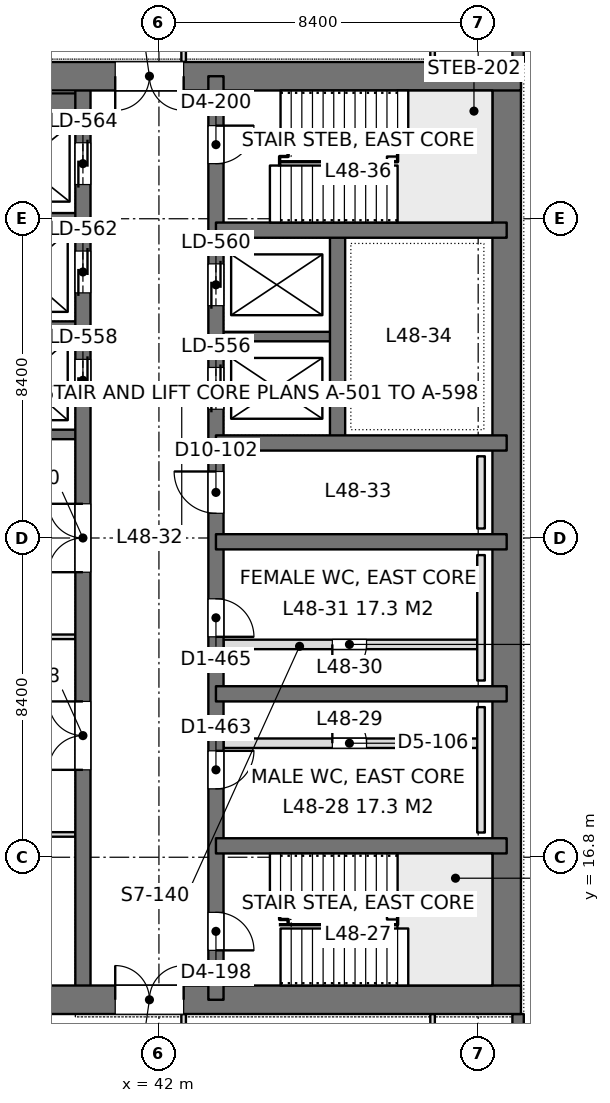
"""IFC4 building model, lengths in metres.
Left out: names, types, materials, properties, quantities, classifications, styles, units other than length and angle.
Written with IfcOpenShell. Run it as: python <this file> out.ifc"""

import sys

from ifc_helpers import new_model, si_unit, direction, frame, frame_2d, origin, place, context, subcontext, project, spatial, rectangle, extrude, element, fill, save


model = new_model("IFC4")
c1 = context("Model", 3, precision=1e-05, world=origin(), true_north=direction((0.0, 1.0)))
c2 = subcontext(c1, "Body", "Model", "MODEL_VIEW")
j1 = project(units=[si_unit("LENGTHUNIT", "METRE"), si_unit("PLANEANGLEUNIT", "RADIAN")], contexts=[c1])
p1 = place(None, origin())
s1 = spatial("IfcSite", under=j1, at=p1, CompositionType="ELEMENT")
p2 = place(p1, origin())
s2 = spatial("IfcBuilding", under=s1, at=p2, CompositionType="ELEMENT")
p3 = place(p2, frame((0.0, 0.0, 211.2)))
s3 = spatial("IfcBuildingStorey", under=s2, at=p3, CompositionType="ELEMENT", Elevation=211.2)
p4 = place(p3, frame((33.675, 13.05, 0.0), z_axis=(0.0, 0.0, 1.0), x_axis=(1.0, 0.0, 0.0)))
e1 = element("IfcWall", 1, at=p4, inside=s3, PredefinedType="SHEAR", context=c2, shape_type="SweptSolid", body=[
    extrude(rectangle(XDim=17.85, YDim=0.75, at=frame_2d((8.925, 0.0))), origin(), (0.0, 0.0, 1.0), 4.2),
])
p5 = place(p4, frame((7.175, 0.0, 0.0)))
e2 = element("IfcOpeningElement", 2, at=p5, cuts=e1, PredefinedType="OPENING", context=c2, shape_type="SweptSolid", body=[
    extrude(rectangle(XDim=1.8, YDim=2.4, at=frame_2d((0.9, 1.2))), frame((0.0, 0.385, 0.0), z_axis=(0.0, -1.0, 0.0), x_axis=(1.0, 0.0, 0.0)), (0.0, 0.0, 1.0), 0.77),
])
p6 = place(p3, frame((33.675, 37.35, 0.0), z_axis=(0.0, 0.0, 1.0), x_axis=(1.0, 0.0, 0.0)))
e3 = element("IfcWall", 3, at=p6, inside=s3, PredefinedType="SHEAR", context=c2, shape_type="SweptSolid", body=[
    extrude(rectangle(XDim=17.85, YDim=0.75, at=frame_2d((8.925, 0.0))), origin(), (0.0, 0.0, 1.0), 4.2),
])
p7 = place(p6, frame((7.175, 0.0, 0.0)))
e4 = element("IfcOpeningElement", 4, at=p7, cuts=e3, PredefinedType="OPENING", context=c2, shape_type="SweptSolid", body=[
    extrude(rectangle(XDim=1.8, YDim=2.4, at=frame_2d((0.9, 1.2))), frame((0.0, 0.385, 0.0), z_axis=(0.0, -1.0, 0.0), x_axis=(1.0, 0.0, 0.0)), (0.0, 0.0, 1.0), 0.77),
])
p8 = place(p3, frame((51.15, 13.05, 0.0), z_axis=(0.0, 0.0, 1.0), x_axis=(0.0, 1.0, 0.0)))
e5 = element("IfcWall", 5, at=p8, inside=s3, PredefinedType="SHEAR", context=c2, shape_type="SweptSolid", body=[
    extrude(rectangle(XDim=24.3, YDim=0.75, at=frame_2d((12.15, 0.0))), origin(), (0.0, 0.0, 1.0), 4.2),
])
p9 = place(p3, frame((43.5, 13.05, 0.0), z_axis=(0.0, 0.0, 1.0), x_axis=(0.0, 1.0, 0.0)))
e6 = element("IfcWall", 6, at=p9, inside=s3, PredefinedType="SHEAR", context=c2, shape_type="SweptSolid", body=[
    extrude(rectangle(XDim=24.3, YDim=0.4, at=frame_2d((12.15, 0.0))), origin(), (0.0, 0.0, 1.0), 4.2),
])
p10 = place(p9, frame((1.3, 0.0, 0.0)))
e7 = element("IfcOpeningElement", 7, at=p10, cuts=e6, PredefinedType="OPENING", context=c2, shape_type="SweptSolid", body=[
    extrude(rectangle(XDim=1.0, YDim=2.2, at=frame_2d((0.5, 1.1))), frame((0.0, 0.21, 0.0), z_axis=(0.0, -1.0, 0.0), x_axis=(1.0, 0.0, 0.0)), (0.0, 0.0, 1.0), 0.42),
])
p11 = place(p9, frame((22.0, 0.0, 0.0)))
e8 = element("IfcOpeningElement", 8, at=p11, cuts=e6, PredefinedType="OPENING", context=c2, shape_type="SweptSolid", body=[
    extrude(rectangle(XDim=1.0, YDim=2.2, at=frame_2d((0.5, 1.1))), frame((0.0, 0.21, 0.0), z_axis=(0.0, -1.0, 0.0), x_axis=(1.0, 0.0, 0.0)), (0.0, 0.0, 1.0), 0.42),
])
p12 = place(p9, frame((5.55, 0.0, 0.0)))
e9 = element("IfcOpeningElement", 9, at=p12, cuts=e6, PredefinedType="OPENING", context=c2, shape_type="SweptSolid", body=[
    extrude(rectangle(XDim=1.0, YDim=2.2, at=frame_2d((0.5, 1.1))), frame((0.0, 0.21, 0.0), z_axis=(0.0, -1.0, 0.0), x_axis=(1.0, 0.0, 0.0)), (0.0, 0.0, 1.0), 0.42),
])
p13 = place(p9, frame((9.55, 0.0, 0.0)))
e10 = element("IfcOpeningElement", 10, at=p13, cuts=e6, PredefinedType="OPENING", context=c2, shape_type="SweptSolid", body=[
    extrude(rectangle(XDim=1.0, YDim=2.2, at=frame_2d((0.5, 1.1))), frame((0.0, 0.21, 0.0), z_axis=(0.0, -1.0, 0.0), x_axis=(1.0, 0.0, 0.0)), (0.0, 0.0, 1.0), 0.42),
])
p14 = place(p9, frame((12.8, 0.0, 0.0)))
e11 = element("IfcOpeningElement", 11, at=p14, cuts=e6, PredefinedType="OPENING", context=c2, shape_type="SweptSolid", body=[
    extrude(rectangle(XDim=1.1, YDim=2.2, at=frame_2d((0.55, 1.1))), frame((0.0, 0.21, 0.0), z_axis=(0.0, -1.0, 0.0), x_axis=(1.0, 0.0, 0.0)), (0.0, 0.0, 1.0), 0.42),
])
p15 = place(p9, frame((15.538, 0.0, 0.0)))
e12 = element("IfcOpeningElement", 12, at=p15, cuts=e6, PredefinedType="OPENING", context=c2, shape_type="SweptSolid", body=[
    extrude(rectangle(XDim=1.1, YDim=2.2, at=frame_2d((0.55, 1.1))), frame((0.0, 0.21, 0.0), z_axis=(0.0, -1.0, 0.0), x_axis=(1.0, 0.0, 0.0)), (0.0, 0.0, 1.0), 0.42),
])
p16 = place(p9, frame((18.262, 0.0, 0.0)))
e13 = element("IfcOpeningElement", 13, at=p16, cuts=e6, PredefinedType="OPENING", context=c2, shape_type="SweptSolid", body=[
    extrude(rectangle(XDim=1.1, YDim=2.2, at=frame_2d((0.55, 1.1))), frame((0.0, 0.21, 0.0), z_axis=(0.0, -1.0, 0.0), x_axis=(1.0, 0.0, 0.0)), (0.0, 0.0, 1.0), 0.42),
])
p17 = place(p3, frame((40.0, 13.05, 0.0), z_axis=(0.0, 0.0, 1.0), x_axis=(0.0, 1.0, 0.0)))
e14 = element("IfcWall", 14, at=p17, inside=s3, PredefinedType="SHEAR", context=c2, shape_type="SweptSolid", body=[
    extrude(rectangle(XDim=24.3, YDim=0.4, at=frame_2d((12.15, 0.0))), origin(), (0.0, 0.0, 1.0), 4.2),
])
p18 = place(p17, frame((15.75, 0.0, 0.0)))
e15 = element("IfcOpeningElement", 15, at=p18, cuts=e14, PredefinedType="OPENING", context=c2, shape_type="SweptSolid", body=[
    extrude(rectangle(XDim=1.1, YDim=2.2, at=frame_2d((0.55, 1.1))), frame((0.0, 0.21, 0.0), z_axis=(0.0, -1.0, 0.0), x_axis=(1.0, 0.0, 0.0)), (0.0, 0.0, 1.0), 0.42),
])
p19 = place(p17, frame((18.6, 0.0, 0.0)))
e16 = element("IfcOpeningElement", 16, at=p19, cuts=e14, PredefinedType="OPENING", context=c2, shape_type="SweptSolid", body=[
    extrude(rectangle(XDim=1.1, YDim=2.2, at=frame_2d((0.55, 1.1))), frame((0.0, 0.21, 0.0), z_axis=(0.0, -1.0, 0.0), x_axis=(1.0, 0.0, 0.0)), (0.0, 0.0, 1.0), 0.42),
])
p20 = place(p17, frame((21.45, 0.0, 0.0)))
e17 = element("IfcOpeningElement", 17, at=p20, cuts=e14, PredefinedType="OPENING", context=c2, shape_type="SweptSolid", body=[
    extrude(rectangle(XDim=1.1, YDim=2.2, at=frame_2d((0.55, 1.1))), frame((0.0, 0.21, 0.0), z_axis=(0.0, -1.0, 0.0), x_axis=(1.0, 0.0, 0.0)), (0.0, 0.0, 1.0), 0.42),
])
p21 = place(p17, frame((6.05, 0.0, 0.0)))
e18 = element("IfcOpeningElement", 18, at=p21, cuts=e14, PredefinedType="OPENING", context=c2, shape_type="SweptSolid", body=[
    extrude(rectangle(XDim=1.8, YDim=2.4, at=frame_2d((0.9, 1.2))), frame((0.0, 0.21, 0.0), z_axis=(0.0, -1.0, 0.0), x_axis=(1.0, 0.0, 0.0)), (0.0, 0.0, 1.0), 0.42),
])
p22 = place(p17, frame((11.25, 0.0, 0.0)))
e19 = element("IfcOpeningElement", 19, at=p22, cuts=e14, PredefinedType="OPENING", context=c2, shape_type="SweptSolid", body=[
    extrude(rectangle(XDim=1.8, YDim=2.4, at=frame_2d((0.9, 1.2))), frame((0.0, 0.21, 0.0), z_axis=(0.0, -1.0, 0.0), x_axis=(1.0, 0.0, 0.0)), (0.0, 0.0, 1.0), 0.42),
])
for number, where, z_axis, x_axis in (
    (20, (51.15, 17.1, 0.0), (0.0, 0.0, 1.0), (-1.0, 0.0, 0.0)),
    (21, (51.15, 21.1, 0.0), (0.0, 0.0, 1.0), (-1.0, 0.0, 0.0)),
    (22, (51.15, 25.1, 0.0), (0.0, 0.0, 1.0), (-1.0, 0.0, 0.0)),
    (23, (51.15, 27.7, 0.0), (0.0, 0.0, 1.0), (-1.0, 0.0, 0.0)),
    (24, (51.15, 33.3, 0.0), (0.0, 0.0, 1.0), (-1.0, 0.0, 0.0)),
):
    element("IfcWall", number, at=place(p3, frame(where, z_axis=z_axis, x_axis=x_axis)), inside=s3, PredefinedType="SHEAR", context=c2, shape_type="SweptSolid", body=[
        extrude(rectangle(XDim=7.65, YDim=0.4, at=frame_2d((3.825, 0.0))), origin(), (0.0, 0.0, 1.0), 4.2),
    ])
p23 = place(p3, frame((46.7, 27.7, 0.0), z_axis=(0.0, 0.0, 1.0), x_axis=(0.0, 1.0, 0.0)))
e25 = element("IfcWall", 25, at=p23, inside=s3, PredefinedType="SHEAR", context=c2, shape_type="SweptSolid", body=[
    extrude(rectangle(XDim=5.6, YDim=0.4, at=frame_2d((2.8, 0.0))), origin(), (0.0, 0.0, 1.0), 4.2),
])
p24 = place(p3, frame((46.7, 30.5, 0.0), z_axis=(0.0, 0.0, 1.0), x_axis=(-1.0, 0.0, 0.0)))
e26 = element("IfcWall", 26, at=p24, inside=s3, PredefinedType="SHEAR", context=c2, shape_type="SweptSolid", body=[
    extrude(rectangle(XDim=3.2, YDim=0.25, at=frame_2d((1.6, 0.0))), origin(), (0.0, 0.0, 1.0), 4.2),
])
p25 = place(p3, frame((40.0, 27.925, 0.0), z_axis=(0.0, 0.0, 1.0), x_axis=(-1.0, 0.0, 0.0)))
e27 = element("IfcWall", 27, at=p25, inside=s3, PredefinedType="SHEAR", context=c2, shape_type="SweptSolid", body=[
    extrude(rectangle(XDim=5.95, YDim=0.25, at=frame_2d((2.975, 0.0))), origin(), (0.0, 0.0, 1.0), 4.2),
])
for number, where, z_axis, x_axis in (
    (28, (40.0, 30.775, 0.0), (0.0, 0.0, 1.0), (-1.0, 0.0, 0.0)),
    (29, (40.0, 33.625, 0.0), (0.0, 0.0, 1.0), (-1.0, 0.0, 0.0)),
):
    element("IfcWall", number, at=place(p3, frame(where, z_axis=z_axis, x_axis=x_axis)), inside=s3, PredefinedType="SHEAR", context=c2, shape_type="SweptSolid", body=[
        extrude(rectangle(XDim=3.2, YDim=0.25, at=frame_2d((1.6, 0.0))), origin(), (0.0, 0.0, 1.0), 4.2),
    ])
p26 = place(p3, frame((40.0, 36.625, 0.0), z_axis=(0.0, 0.0, 1.0), x_axis=(-1.0, 0.0, 0.0)))
e30 = element("IfcWall", 30, at=p26, inside=s3, PredefinedType="SHEAR", context=c2, shape_type="SweptSolid", body=[
    extrude(rectangle(XDim=3.2, YDim=0.55, at=frame_2d((1.6, 0.0))), origin(), (0.0, 0.0, 1.0), 4.2),
])
p27 = place(p3, frame((51.45, 42.0, 0.0), z_axis=(0.0, 0.0, 1.0), x_axis=(0.0, -1.0, 0.0)))
e31 = element("IfcWall", 31, at=p27, inside=s3, PredefinedType="SOLIDWALL", context=c2, shape_type="SweptSolid", body=[
    extrude(rectangle(XDim=4.275, YDim=0.3, at=frame_2d((2.137, 0.0))), origin(), (0.0, 0.0, 1.0), 4.05),
])
p28 = place(p27, frame((0.938, 0.0, 0.9)))
e32 = element("IfcOpeningElement", 32, at=p28, cuts=e31, PredefinedType="OPENING", context=c2, shape_type="SweptSolid", body=[
    extrude(rectangle(XDim=2.4, YDim=1.9, at=frame_2d((1.2, 0.95))), frame((0.0, 0.16, 0.0), z_axis=(0.0, -1.0, 0.0), x_axis=(1.0, 0.0, 0.0)), (0.0, 0.0, 1.0), 0.32),
])
p29 = place(p3, frame((51.45, 12.675, 0.0), z_axis=(0.0, 0.0, 1.0), x_axis=(0.0, -1.0, 0.0)))
e33 = element("IfcWall", 33, at=p29, inside=s3, PredefinedType="SOLIDWALL", context=c2, shape_type="SweptSolid", body=[
    extrude(rectangle(XDim=4.275, YDim=0.3, at=frame_2d((2.138, 0.0))), origin(), (0.0, 0.0, 1.0), 4.05),
])
p30 = place(p29, frame((0.938, 0.0, 0.9)))
e34 = element("IfcOpeningElement", 34, at=p30, cuts=e33, PredefinedType="OPENING", context=c2, shape_type="SweptSolid", body=[
    extrude(rectangle(XDim=2.4, YDim=1.9, at=frame_2d((1.2, 0.95))), frame((0.0, 0.16, 0.0), z_axis=(0.0, -1.0, 0.0), x_axis=(1.0, 0.0, 0.0)), (0.0, 0.0, 1.0), 0.32),
])
p31 = place(p3, frame((33.898, 17.4, 0.0), z_axis=(0.0, 0.0, 1.0), x_axis=(1.0, 0.0, 0.0)))
e35 = element("IfcWall", 35, at=p31, inside=s3, PredefinedType="PARTITIONING", context=c2, shape_type="SweptSolid", body=[
    extrude(rectangle(XDim=5.904, YDim=0.12, at=frame_2d((2.952, 0.0))), origin(), (0.0, 0.0, 1.0), 3.55),
])
p32 = place(p3, frame((34.749, 22.6, 0.0), z_axis=(0.0, 0.0, 1.0), x_axis=(1.0, 0.0, 0.0)))
e36 = element("IfcWall", 36, at=p32, inside=s3, PredefinedType="PARTITIONING", context=c2, shape_type="SweptSolid", body=[
    extrude(rectangle(XDim=5.053, YDim=0.12, at=frame_2d((2.526, 0.0))), origin(), (0.0, 0.0, 1.0), 4.05),
])
p33 = place(p3, frame((42.65, 10.758, 0.0), z_axis=(0.0, 0.0, 1.0), x_axis=(0.0, 1.0, 0.0)))
e37 = element("IfcWall", 37, at=p33, inside=s3, PredefinedType="PARTITIONING", context=c2, shape_type="SweptSolid", body=[
    extrude(rectangle(XDim=1.918, YDim=0.12, at=frame_2d((0.959, 0.0))), origin(), (0.0, 0.0, 1.0), 4.05),
])
p34 = place(p33, frame((0.392, 0.0, 0.0)))
e38 = element("IfcOpeningElement", 38, at=p34, cuts=e37, PredefinedType="OPENING", context=c2, shape_type="SweptSolid", body=[
    extrude(rectangle(XDim=1.0, YDim=2.4, at=frame_2d((0.5, 1.2))), frame((0.0, 0.07, 0.0), z_axis=(0.0, -1.0, 0.0), x_axis=(1.0, 0.0, 0.0)), (0.0, 0.0, 1.0), 0.14),
])
p35 = place(p3, frame((49.2, 10.7, 0.0), z_axis=(0.0, 0.0, 1.0), x_axis=(0.0, 1.0, 0.0)))
e39 = element("IfcWall", 39, at=p35, inside=s3, PredefinedType="PARTITIONING", context=c2, shape_type="SweptSolid", body=[
    extrude(rectangle(XDim=1.976, YDim=0.12, at=frame_2d((0.988, 0.0))), origin(), (0.0, 0.0, 1.0), 4.05),
])
p36 = place(p3, frame((42.65, 37.724, 0.0), z_axis=(0.0, 0.0, 1.0), x_axis=(0.0, 1.0, 0.0)))
e40 = element("IfcWall", 40, at=p36, inside=s3, PredefinedType="PARTITIONING", context=c2, shape_type="SweptSolid", body=[
    extrude(rectangle(XDim=1.918, YDim=0.12, at=frame_2d((0.959, 0.0))), origin(), (0.0, 0.0, 1.0), 4.05),
])
p37 = place(p36, frame((0.526, 0.0, 0.0)))
e41 = element("IfcOpeningElement", 41, at=p37, cuts=e40, PredefinedType="OPENING", context=c2, shape_type="SweptSolid", body=[
    extrude(rectangle(XDim=1.0, YDim=2.4, at=frame_2d((0.5, 1.2))), frame((0.0, 0.07, 0.0), z_axis=(0.0, -1.0, 0.0), x_axis=(1.0, 0.0, 0.0)), (0.0, 0.0, 1.0), 0.14),
])
p38 = place(p3, frame((49.2, 37.724, 0.0), z_axis=(0.0, 0.0, 1.0), x_axis=(0.0, 1.0, 0.0)))
e42 = element("IfcWall", 42, at=p38, inside=s3, PredefinedType="PARTITIONING", context=c2, shape_type="SweptSolid", body=[
    extrude(rectangle(XDim=1.976, YDim=0.12, at=frame_2d((0.988, 0.0))), origin(), (0.0, 0.0, 1.0), 4.05),
])
p39 = place(p3, frame((43.7, 22.4, 0.0), z_axis=(0.0, 0.0, 1.0), x_axis=(1.0, 0.0, 0.0)))
e43 = element("IfcWall", 43, at=p39, inside=s3, PredefinedType="PARTITIONING", context=c2, shape_type="SweptSolid", body=[
    extrude(rectangle(XDim=6.675, YDim=0.25, at=frame_2d((3.337, 0.0))), origin(), (0.0, 0.0, 1.0), 4.0),
])
p40 = place(p39, frame((2.863, 0.0, 0.0)))
e44 = element("IfcOpeningElement", 44, at=p40, cuts=e43, PredefinedType="OPENING", context=c2, shape_type="SweptSolid", body=[
    extrude(rectangle(XDim=0.9, YDim=2.2, at=frame_2d((0.45, 1.1))), frame((0.0, 0.135, 0.0), z_axis=(0.0, -1.0, 0.0), x_axis=(1.0, 0.0, 0.0)), (0.0, 0.0, 1.0), 0.27),
])
p41 = place(p3, frame((43.7, 19.8, 0.0), z_axis=(0.0, 0.0, 1.0), x_axis=(1.0, 0.0, 0.0)))
e45 = element("IfcWall", 45, at=p41, inside=s3, PredefinedType="PARTITIONING", context=c2, shape_type="SweptSolid", body=[
    extrude(rectangle(XDim=6.675, YDim=0.25, at=frame_2d((3.337, 0.0))), origin(), (0.0, 0.0, 1.0), 4.0),
])
p42 = place(p41, frame((2.863, 0.0, 0.0)))
e46 = element("IfcOpeningElement", 46, at=p42, cuts=e45, PredefinedType="OPENING", context=c2, shape_type="SweptSolid", body=[
    extrude(rectangle(XDim=0.9, YDim=2.2, at=frame_2d((0.45, 1.1))), frame((0.0, 0.135, 0.0), z_axis=(0.0, -1.0, 0.0), x_axis=(1.0, 0.0, 0.0)), (0.0, 0.0, 1.0), 0.27),
])
for number, where, z_axis, x_axis in (
    (47, (50.475, 17.45, 0.0), (0.0, 0.0, 1.0), (0.0, 1.0, 0.0)),
    (48, (50.475, 21.45, 0.0), (0.0, 0.0, 1.0), (0.0, 1.0, 0.0)),
):
    element("IfcWall", number, at=place(p3, frame(where, z_axis=z_axis, x_axis=x_axis)), inside=s3, PredefinedType="PLUMBINGWALL", context=c2, shape_type="SweptSolid", body=[
        extrude(rectangle(XDim=3.3, YDim=0.2, at=frame_2d((1.65, 0.0))), origin(), (0.0, 0.0, 1.0), 1.2),
    ])
p43 = place(p3, frame((50.475, 25.45, 0.0), z_axis=(0.0, 0.0, 1.0), x_axis=(0.0, 1.0, 0.0)))
e49 = element("IfcWall", 49, at=p43, inside=s3, PredefinedType="PLUMBINGWALL", context=c2, shape_type="SweptSolid", body=[
    extrude(rectangle(XDim=1.9, YDim=0.2, at=frame_2d((0.95, 0.0))), origin(), (0.0, 0.0, 1.0), 1.2),
])
p44 = place(p5, origin())
e50 = element("IfcDoor", 50, at=p44, inside=s3, OperationType="DOUBLE_DOOR_SINGLE_SWING", PredefinedType="DOOR", context=c2, shape_type="SweptSolid", body=[
    extrude(rectangle(XDim=1.8, YDim=2.4, at=frame_2d((0.9, 1.2))), frame((0.0, 0.025, 0.0), z_axis=(0.0, -1.0, 0.0), x_axis=(1.0, 0.0, 0.0)), (0.0, 0.0, 1.0), 0.05),
])
fill(e2, e50)
p45 = place(p7, frame((1.8, 0.0, 0.0), z_axis=(0.0, 0.0, 1.0), x_axis=(-1.0, 0.0, 0.0)))
e51 = element("IfcDoor", 51, at=p45, inside=s3, OperationType="DOUBLE_DOOR_SINGLE_SWING", PredefinedType="DOOR", context=c2, shape_type="SweptSolid", body=[
    extrude(rectangle(XDim=1.8, YDim=2.4, at=frame_2d((0.9, 1.2))), frame((0.0, 0.025, 0.0), z_axis=(0.0, -1.0, 0.0), x_axis=(1.0, 0.0, 0.0)), (0.0, 0.0, 1.0), 0.05),
])
fill(e4, e51)
p46 = place(p10, frame((1.0, 0.0, 0.0), z_axis=(0.0, 0.0, 1.0), x_axis=(-1.0, 0.0, 0.0)))
e52 = element("IfcDoor", 52, at=p46, inside=s3, OperationType="SINGLE_SWING_RIGHT", PredefinedType="DOOR", context=c2, shape_type="SweptSolid", body=[
    extrude(rectangle(XDim=1.0, YDim=2.2, at=frame_2d((0.5, 1.1))), frame((0.0, 0.025, 0.0), z_axis=(0.0, -1.0, 0.0), x_axis=(1.0, 0.0, 0.0)), (0.0, 0.0, 1.0), 0.05),
])
fill(e7, e52)
p47 = place(p11, frame((1.0, 0.0, 0.0), z_axis=(0.0, 0.0, 1.0), x_axis=(-1.0, 0.0, 0.0)))
e53 = element("IfcDoor", 53, at=p47, inside=s3, OperationType="SINGLE_SWING_LEFT", PredefinedType="DOOR", context=c2, shape_type="SweptSolid", body=[
    extrude(rectangle(XDim=1.0, YDim=2.2, at=frame_2d((0.5, 1.1))), frame((0.0, 0.025, 0.0), z_axis=(0.0, -1.0, 0.0), x_axis=(1.0, 0.0, 0.0)), (0.0, 0.0, 1.0), 0.05),
])
fill(e8, e53)
p48 = place(p12, frame((1.0, 0.0, 0.0), z_axis=(0.0, 0.0, 1.0), x_axis=(-1.0, 0.0, 0.0)))
e54 = element("IfcDoor", 54, at=p48, inside=s3, OperationType="SINGLE_SWING_LEFT", PredefinedType="DOOR", context=c2, shape_type="SweptSolid", body=[
    extrude(rectangle(XDim=1.0, YDim=2.2, at=frame_2d((0.5, 1.1))), frame((0.0, 0.025, 0.0), z_axis=(0.0, -1.0, 0.0), x_axis=(1.0, 0.0, 0.0)), (0.0, 0.0, 1.0), 0.05),
])
fill(e9, e54)
p49 = place(p13, frame((1.0, 0.0, 0.0), z_axis=(0.0, 0.0, 1.0), x_axis=(-1.0, 0.0, 0.0)))
e55 = element("IfcDoor", 55, at=p49, inside=s3, OperationType="SINGLE_SWING_RIGHT", PredefinedType="DOOR", context=c2, shape_type="SweptSolid", body=[
    extrude(rectangle(XDim=1.0, YDim=2.2, at=frame_2d((0.5, 1.1))), frame((0.0, 0.025, 0.0), z_axis=(0.0, -1.0, 0.0), x_axis=(1.0, 0.0, 0.0)), (0.0, 0.0, 1.0), 0.05),
])
fill(e10, e55)
p50 = place(p14, origin())
e56 = element("IfcDoor", 56, at=p50, inside=s3, OperationType="SINGLE_SWING_RIGHT", PredefinedType="DOOR", context=c2, shape_type="SweptSolid", body=[
    extrude(rectangle(XDim=1.1, YDim=2.2, at=frame_2d((0.55, 1.1))), frame((0.0, 0.025, 0.0), z_axis=(0.0, -1.0, 0.0), x_axis=(1.0, 0.0, 0.0)), (0.0, 0.0, 1.0), 0.05),
])
fill(e11, e56)
p51 = place(p18, origin())
e57 = element("IfcDoor", 57, at=p51, inside=s3, OperationType="DOUBLE_DOOR_SLIDING", PredefinedType="DOOR", context=c2, shape_type="SweptSolid", body=[
    extrude(rectangle(XDim=1.1, YDim=2.2, at=frame_2d((0.55, 1.1))), frame((0.0, 0.025, 0.0), z_axis=(0.0, -1.0, 0.0), x_axis=(1.0, 0.0, 0.0)), (0.0, 0.0, 1.0), 0.05),
])
fill(e15, e57)
p52 = place(p19, origin())
e58 = element("IfcDoor", 58, at=p52, inside=s3, OperationType="DOUBLE_DOOR_SLIDING", PredefinedType="DOOR", context=c2, shape_type="SweptSolid", body=[
    extrude(rectangle(XDim=1.1, YDim=2.2, at=frame_2d((0.55, 1.1))), frame((0.0, 0.025, 0.0), z_axis=(0.0, -1.0, 0.0), x_axis=(1.0, 0.0, 0.0)), (0.0, 0.0, 1.0), 0.05),
])
fill(e16, e58)
p53 = place(p20, origin())
e59 = element("IfcDoor", 59, at=p53, inside=s3, OperationType="DOUBLE_DOOR_SLIDING", PredefinedType="DOOR", context=c2, shape_type="SweptSolid", body=[
    extrude(rectangle(XDim=1.1, YDim=2.2, at=frame_2d((0.55, 1.1))), frame((0.0, 0.025, 0.0), z_axis=(0.0, -1.0, 0.0), x_axis=(1.0, 0.0, 0.0)), (0.0, 0.0, 1.0), 0.05),
])
fill(e17, e59)
p54 = place(p15, origin())
e60 = element("IfcDoor", 60, at=p54, inside=s3, OperationType="DOUBLE_DOOR_SLIDING", PredefinedType="DOOR", context=c2, shape_type="SweptSolid", body=[
    extrude(rectangle(XDim=1.1, YDim=2.2, at=frame_2d((0.55, 1.1))), frame((0.0, 0.025, 0.0), z_axis=(0.0, -1.0, 0.0), x_axis=(1.0, 0.0, 0.0)), (0.0, 0.0, 1.0), 0.05),
])
fill(e12, e60)
p55 = place(p16, origin())
e61 = element("IfcDoor", 61, at=p55, inside=s3, OperationType="DOUBLE_DOOR_SLIDING", PredefinedType="DOOR", context=c2, shape_type="SweptSolid", body=[
    extrude(rectangle(XDim=1.1, YDim=2.2, at=frame_2d((0.55, 1.1))), frame((0.0, 0.025, 0.0), z_axis=(0.0, -1.0, 0.0), x_axis=(1.0, 0.0, 0.0)), (0.0, 0.0, 1.0), 0.05),
])
fill(e13, e61)
p56 = place(p21, origin())
e62 = element("IfcDoor", 62, at=p56, inside=s3, OperationType="DOUBLE_DOOR_SINGLE_SWING", PredefinedType="DOOR", context=c2, shape_type="SweptSolid", body=[
    extrude(rectangle(XDim=1.8, YDim=2.4, at=frame_2d((0.9, 1.2))), frame((0.0, 0.025, 0.0), z_axis=(0.0, -1.0, 0.0), x_axis=(1.0, 0.0, 0.0)), (0.0, 0.0, 1.0), 0.05),
])
fill(e18, e62)
p57 = place(p22, origin())
e63 = element("IfcDoor", 63, at=p57, inside=s3, OperationType="DOUBLE_DOOR_SINGLE_SWING", PredefinedType="DOOR", context=c2, shape_type="SweptSolid", body=[
    extrude(rectangle(XDim=1.8, YDim=2.4, at=frame_2d((0.9, 1.2))), frame((0.0, 0.025, 0.0), z_axis=(0.0, -1.0, 0.0), x_axis=(1.0, 0.0, 0.0)), (0.0, 0.0, 1.0), 0.05),
])
fill(e19, e63)
p58 = place(p40, frame((0.9, 0.0, 0.0), z_axis=(0.0, 0.0, 1.0), x_axis=(-1.0, 0.0, 0.0)))
e64 = element("IfcDoor", 64, at=p58, inside=s3, OperationType="SINGLE_SWING_RIGHT", PredefinedType="DOOR", context=c2, shape_type="SweptSolid", body=[
    extrude(rectangle(XDim=0.9, YDim=2.2, at=frame_2d((0.45, 1.1))), frame((0.0, 0.025, 0.0), z_axis=(0.0, -1.0, 0.0), x_axis=(1.0, 0.0, 0.0)), (0.0, 0.0, 1.0), 0.05),
])
fill(e44, e64)
p59 = place(p42, origin())
e65 = element("IfcDoor", 65, at=p59, inside=s3, OperationType="SINGLE_SWING_LEFT", PredefinedType="DOOR", context=c2, shape_type="SweptSolid", body=[
    extrude(rectangle(XDim=0.9, YDim=2.2, at=frame_2d((0.45, 1.1))), frame((0.0, 0.025, 0.0), z_axis=(0.0, -1.0, 0.0), x_axis=(1.0, 0.0, 0.0)), (0.0, 0.0, 1.0), 0.05),
])
fill(e46, e65)
save(model, sys.argv[1])
